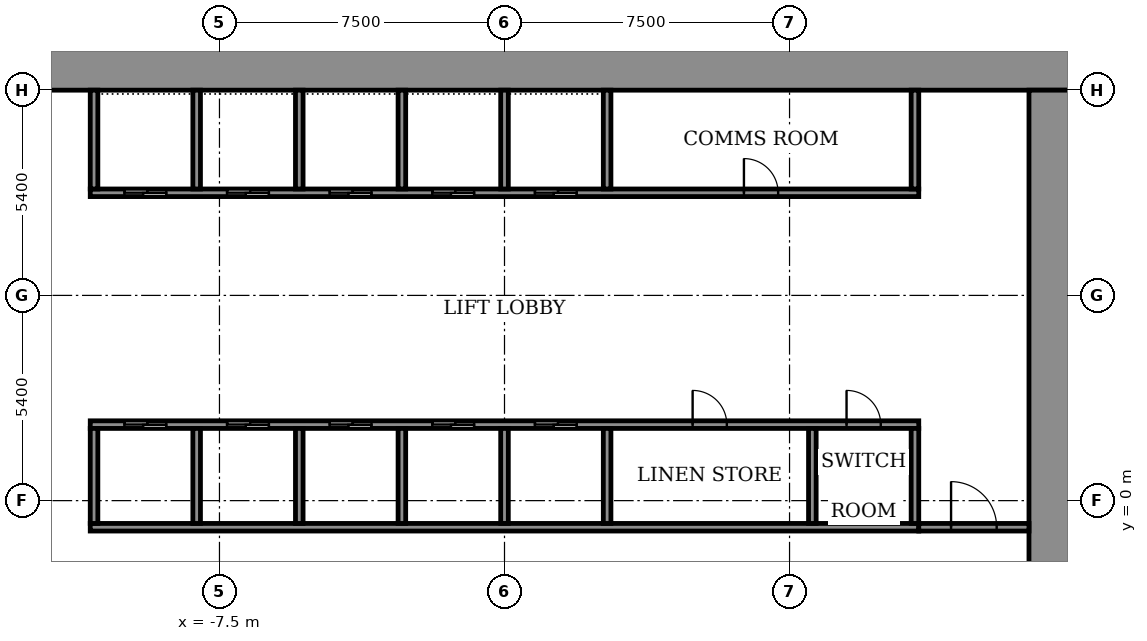
"""IFC4 building model, lengths in metres.
Left out: names, types, materials, properties, quantities, classifications, styles, units other than length and angle.
Written with IfcOpenShell. Run it as: python <this file> out.ifc"""

import sys

from ifc_helpers import new_model, si_unit, direction, frame, frame_2d, origin, place, context, subcontext, project, spatial, rectangle, extrude, element, fill, save


model = new_model("IFC4")
c1 = context("Model", 3, precision=1e-05, world=origin(), true_north=direction((0.0, 1.0)))
c2 = subcontext(c1, "Body", "Model", "MODEL_VIEW")
j1 = project(units=[si_unit("LENGTHUNIT", "METRE"), si_unit("PLANEANGLEUNIT", "RADIAN")], contexts=[c1])
p1 = place(None, origin())
s1 = spatial("IfcSite", under=j1, at=p1, CompositionType="ELEMENT")
p2 = place(p1, origin())
s2 = spatial("IfcBuilding", under=s1, at=p2, CompositionType="ELEMENT")
p3 = place(p2, frame((0.0, 0.0, 71.1)))
s3 = spatial("IfcBuildingStorey", under=s2, at=p3, CompositionType="ELEMENT", Elevation=71.1)
p4 = place(p3, frame((-14.9, 11.35, 0.0), z_axis=(0.0, 0.0, 1.0), x_axis=(1.0, 0.0, 0.0)))
e1 = element("IfcWall", 1, at=p4, inside=s3, PredefinedType="SHEAR", context=c2, shape_type="SweptSolid", body=[
    extrude(rectangle(XDim=29.8, YDim=1.1, at=frame_2d((14.9, 0.0))), origin(), (0.0, 0.0, 1.0), 3.6),
])
p5 = place(p3, frame((14.35, -10.8, 0.0), z_axis=(0.0, 0.0, 1.0), x_axis=(0.0, 1.0, 0.0)))
e2 = element("IfcWall", 2, at=p5, inside=s3, PredefinedType="SHEAR", context=c2, shape_type="SweptSolid", body=[
    extrude(rectangle(XDim=21.6, YDim=1.1, at=frame_2d((10.8, 0.0))), origin(), (0.0, 0.0, 1.0), 3.6),
])
p6 = place(p5, frame((1.2, 0.0, 0.0)))
e3 = element("IfcOpeningElement", 3, at=p6, cuts=e2, PredefinedType="OPENING", context=c2, shape_type="SweptSolid", body=[
    extrude(rectangle(XDim=1.2, YDim=2.1, at=frame_2d((0.6, 1.05))), frame((0.0, 0.56, 0.0), z_axis=(0.0, -1.0, 0.0), x_axis=(1.0, 0.0, 0.0)), (0.0, 0.0, 1.0), 1.12),
])
p7 = place(p3, frame((-10.9, -0.7, 0.0), z_axis=(0.0, 0.0, 1.0), x_axis=(1.0, 0.0, 0.0)))
e4 = element("IfcWall", 4, at=p7, inside=s3, PredefinedType="SHEAR", context=c2, shape_type="SweptSolid", body=[
    extrude(rectangle(XDim=21.8, YDim=0.2, at=frame_2d((10.9, 0.0))), origin(), (0.0, 0.0, 1.0), 3.05),
])
p8 = place(p3, frame((-10.9, 2.0, 0.0), z_axis=(0.0, 0.0, 1.0), x_axis=(1.0, 0.0, 0.0)))
e5 = element("IfcWall", 5, at=p8, inside=s3, PredefinedType="SHEAR", context=c2, shape_type="SweptSolid", body=[
    extrude(rectangle(XDim=21.8, YDim=0.2, at=frame_2d((10.9, 0.0))), origin(), (0.0, 0.0, 1.0), 3.05),
])
p9 = place(p8, frame((0.9, 0.0, 0.0)))
e6 = element("IfcOpeningElement", 6, at=p9, cuts=e5, PredefinedType="OPENING", context=c2, shape_type="SweptSolid", body=[
    extrude(rectangle(XDim=1.1, YDim=2.1, at=frame_2d((0.55, 1.05))), frame((0.0, 0.11, 0.0), z_axis=(0.0, -1.0, 0.0), x_axis=(1.0, 0.0, 0.0)), (0.0, 0.0, 1.0), 0.22),
])
p10 = place(p8, frame((3.6, 0.0, 0.0)))
e7 = element("IfcOpeningElement", 7, at=p10, cuts=e5, PredefinedType="OPENING", context=c2, shape_type="SweptSolid", body=[
    extrude(rectangle(XDim=1.1, YDim=2.1, at=frame_2d((0.55, 1.05))), frame((0.0, 0.11, 0.0), z_axis=(0.0, -1.0, 0.0), x_axis=(1.0, 0.0, 0.0)), (0.0, 0.0, 1.0), 0.22),
])
p11 = place(p8, frame((6.3, 0.0, 0.0)))
e8 = element("IfcOpeningElement", 8, at=p11, cuts=e5, PredefinedType="OPENING", context=c2, shape_type="SweptSolid", body=[
    extrude(rectangle(XDim=1.1, YDim=2.1, at=frame_2d((0.55, 1.05))), frame((0.0, 0.11, 0.0), z_axis=(0.0, -1.0, 0.0), x_axis=(1.0, 0.0, 0.0)), (0.0, 0.0, 1.0), 0.22),
])
p12 = place(p8, frame((9.0, 0.0, 0.0)))
e9 = element("IfcOpeningElement", 9, at=p12, cuts=e5, PredefinedType="OPENING", context=c2, shape_type="SweptSolid", body=[
    extrude(rectangle(XDim=1.1, YDim=2.1, at=frame_2d((0.55, 1.05))), frame((0.0, 0.11, 0.0), z_axis=(0.0, -1.0, 0.0), x_axis=(1.0, 0.0, 0.0)), (0.0, 0.0, 1.0), 0.22),
])
p13 = place(p8, frame((11.7, 0.0, 0.0)))
e10 = element("IfcOpeningElement", 10, at=p13, cuts=e5, PredefinedType="OPENING", context=c2, shape_type="SweptSolid", body=[
    extrude(rectangle(XDim=1.1, YDim=2.1, at=frame_2d((0.55, 1.05))), frame((0.0, 0.11, 0.0), z_axis=(0.0, -1.0, 0.0), x_axis=(1.0, 0.0, 0.0)), (0.0, 0.0, 1.0), 0.22),
])
p14 = place(p8, frame((15.85, 0.0, 0.0)))
e11 = element("IfcOpeningElement", 11, at=p14, cuts=e5, PredefinedType="OPENING", context=c2, shape_type="SweptSolid", body=[
    extrude(rectangle(XDim=0.9, YDim=2.1, at=frame_2d((0.45, 1.05))), frame((0.0, 0.11, 0.0), z_axis=(0.0, -1.0, 0.0), x_axis=(1.0, 0.0, 0.0)), (0.0, 0.0, 1.0), 0.22),
])
p15 = place(p8, frame((19.9, 0.0, 0.0)))
e12 = element("IfcOpeningElement", 12, at=p15, cuts=e5, PredefinedType="OPENING", context=c2, shape_type="SweptSolid", body=[
    extrude(rectangle(XDim=0.9, YDim=2.1, at=frame_2d((0.45, 1.05))), frame((0.0, 0.11, 0.0), z_axis=(0.0, -1.0, 0.0), x_axis=(1.0, 0.0, 0.0)), (0.0, 0.0, 1.0), 0.22),
])
p16 = place(p3, frame((-10.9, 8.1, 0.0), z_axis=(0.0, 0.0, 1.0), x_axis=(1.0, 0.0, 0.0)))
e13 = element("IfcWall", 13, at=p16, inside=s3, PredefinedType="SHEAR", context=c2, shape_type="SweptSolid", body=[
    extrude(rectangle(XDim=21.8, YDim=0.2, at=frame_2d((10.9, 0.0))), origin(), (0.0, 0.0, 1.0), 3.05),
])
p17 = place(p16, frame((0.9, 0.0, 0.0)))
e14 = element("IfcOpeningElement", 14, at=p17, cuts=e13, PredefinedType="OPENING", context=c2, shape_type="SweptSolid", body=[
    extrude(rectangle(XDim=1.1, YDim=2.1, at=frame_2d((0.55, 1.05))), frame((0.0, 0.11, 0.0), z_axis=(0.0, -1.0, 0.0), x_axis=(1.0, 0.0, 0.0)), (0.0, 0.0, 1.0), 0.22),
])
p18 = place(p16, frame((3.6, 0.0, 0.0)))
e15 = element("IfcOpeningElement", 15, at=p18, cuts=e13, PredefinedType="OPENING", context=c2, shape_type="SweptSolid", body=[
    extrude(rectangle(XDim=1.1, YDim=2.1, at=frame_2d((0.55, 1.05))), frame((0.0, 0.11, 0.0), z_axis=(0.0, -1.0, 0.0), x_axis=(1.0, 0.0, 0.0)), (0.0, 0.0, 1.0), 0.22),
])
p19 = place(p16, frame((6.3, 0.0, 0.0)))
e16 = element("IfcOpeningElement", 16, at=p19, cuts=e13, PredefinedType="OPENING", context=c2, shape_type="SweptSolid", body=[
    extrude(rectangle(XDim=1.1, YDim=2.1, at=frame_2d((0.55, 1.05))), frame((0.0, 0.11, 0.0), z_axis=(0.0, -1.0, 0.0), x_axis=(1.0, 0.0, 0.0)), (0.0, 0.0, 1.0), 0.22),
])
p20 = place(p16, frame((9.0, 0.0, 0.0)))
e17 = element("IfcOpeningElement", 17, at=p20, cuts=e13, PredefinedType="OPENING", context=c2, shape_type="SweptSolid", body=[
    extrude(rectangle(XDim=1.1, YDim=2.1, at=frame_2d((0.55, 1.05))), frame((0.0, 0.11, 0.0), z_axis=(0.0, -1.0, 0.0), x_axis=(1.0, 0.0, 0.0)), (0.0, 0.0, 1.0), 0.22),
])
p21 = place(p16, frame((11.7, 0.0, 0.0)))
e18 = element("IfcOpeningElement", 18, at=p21, cuts=e13, PredefinedType="OPENING", context=c2, shape_type="SweptSolid", body=[
    extrude(rectangle(XDim=1.1, YDim=2.1, at=frame_2d((0.55, 1.05))), frame((0.0, 0.11, 0.0), z_axis=(0.0, -1.0, 0.0), x_axis=(1.0, 0.0, 0.0)), (0.0, 0.0, 1.0), 0.22),
])
p22 = place(p16, frame((17.2, 0.0, 0.0)))
e19 = element("IfcOpeningElement", 19, at=p22, cuts=e13, PredefinedType="OPENING", context=c2, shape_type="SweptSolid", body=[
    extrude(rectangle(XDim=0.9, YDim=2.1, at=frame_2d((0.45, 1.05))), frame((0.0, 0.11, 0.0), z_axis=(0.0, -1.0, 0.0), x_axis=(1.0, 0.0, 0.0)), (0.0, 0.0, 1.0), 0.22),
])
for number, where, z_axis, x_axis in (
    (20, (-10.8, -0.6, 0.0), (0.0, 0.0, 1.0), (0.0, 1.0, 0.0)),
    (21, (-8.1, -0.6, 0.0), (0.0, 0.0, 1.0), (0.0, 1.0, 0.0)),
    (22, (-5.4, -0.6, 0.0), (0.0, 0.0, 1.0), (0.0, 1.0, 0.0)),
    (23, (-2.7, -0.6, 0.0), (0.0, 0.0, 1.0), (0.0, 1.0, 0.0)),
    (24, (0.0, -0.6, 0.0), (0.0, 0.0, 1.0), (0.0, 1.0, 0.0)),
    (25, (2.7, -0.6, 0.0), (0.0, 0.0, 1.0), (0.0, 1.0, 0.0)),
):
    element("IfcWall", number, at=place(p3, frame(where, z_axis=z_axis, x_axis=x_axis)), inside=s3, PredefinedType="SHEAR", context=c2, shape_type="SweptSolid", body=[
        extrude(rectangle(XDim=2.5, YDim=0.2, at=frame_2d((1.25, 0.0))), origin(), (0.0, 0.0, 1.0), 3.05),
    ])
for number, where, z_axis, x_axis in (
    (26, (8.1, -0.6, 0.0), (0.0, 0.0, 1.0), (0.0, 1.0, 0.0)),
    (27, (10.8, -0.6, 0.0), (0.0, 0.0, 1.0), (0.0, 1.0, 0.0)),
):
    element("IfcWall", number, at=place(p3, frame(where, z_axis=z_axis, x_axis=x_axis)), inside=s3, PredefinedType="STANDARD", context=c2, shape_type="SweptSolid", body=[
        extrude(rectangle(XDim=2.5, YDim=0.2, at=frame_2d((1.25, 0.0))), origin(), (0.0, 0.0, 1.0), 3.05),
    ])
for number, where, z_axis, x_axis in (
    (28, (-10.8, 8.2, 0.0), (0.0, 0.0, 1.0), (0.0, 1.0, 0.0)),
    (29, (-8.1, 8.2, 0.0), (0.0, 0.0, 1.0), (0.0, 1.0, 0.0)),
    (30, (-5.4, 8.2, 0.0), (0.0, 0.0, 1.0), (0.0, 1.0, 0.0)),
    (31, (-2.7, 8.2, 0.0), (0.0, 0.0, 1.0), (0.0, 1.0, 0.0)),
    (32, (0.0, 8.2, 0.0), (0.0, 0.0, 1.0), (0.0, 1.0, 0.0)),
    (33, (2.7, 8.2, 0.0), (0.0, 0.0, 1.0), (0.0, 1.0, 0.0)),
):
    element("IfcWall", number, at=place(p3, frame(where, z_axis=z_axis, x_axis=x_axis)), inside=s3, PredefinedType="SHEAR", context=c2, shape_type="SweptSolid", body=[
        extrude(rectangle(XDim=2.6, YDim=0.2, at=frame_2d((1.3, 0.0))), origin(), (0.0, 0.0, 1.0), 3.05),
    ])
p23 = place(p3, frame((10.8, 8.2, 0.0), z_axis=(0.0, 0.0, 1.0), x_axis=(0.0, 1.0, 0.0)))
e34 = element("IfcWall", 34, at=p23, inside=s3, PredefinedType="STANDARD", context=c2, shape_type="SweptSolid", body=[
    extrude(rectangle(XDim=2.6, YDim=0.2, at=frame_2d((1.3, 0.0))), origin(), (0.0, 0.0, 1.0), 3.05),
])
p24 = place(p3, frame((10.9, -0.7, 0.0), z_axis=(0.0, 0.0, 1.0), x_axis=(1.0, 0.0, 0.0)))
e35 = element("IfcWall", 35, at=p24, inside=s3, PredefinedType="STANDARD", context=c2, shape_type="SweptSolid", body=[
    extrude(rectangle(XDim=2.9, YDim=0.2, at=frame_2d((1.45, 0.0))), origin(), (0.0, 0.0, 1.0), 3.05),
])
p25 = place(p24, frame((0.85, 0.0, 0.0)))
e36 = element("IfcOpeningElement", 36, at=p25, cuts=e35, PredefinedType="OPENING", context=c2, shape_type="SweptSolid", body=[
    extrude(rectangle(XDim=1.2, YDim=2.1, at=frame_2d((0.6, 1.05))), frame((0.0, 0.11, 0.0), z_axis=(0.0, -1.0, 0.0), x_axis=(1.0, 0.0, 0.0)), (0.0, 0.0, 1.0), 0.22),
])
p26 = place(p9, origin())
e37 = element("IfcDoor", 37, at=p26, inside=s3, OperationType="SLIDING_TO_LEFT", PredefinedType="DOOR", context=c2, shape_type="SweptSolid", body=[
    extrude(rectangle(XDim=1.1, YDim=2.1, at=frame_2d((0.55, 1.05))), frame((0.0, 0.025, 0.0), z_axis=(0.0, -1.0, 0.0), x_axis=(1.0, 0.0, 0.0)), (0.0, 0.0, 1.0), 0.05),
])
fill(e6, e37)
p27 = place(p10, origin())
e38 = element("IfcDoor", 38, at=p27, inside=s3, OperationType="SLIDING_TO_LEFT", PredefinedType="DOOR", context=c2, shape_type="SweptSolid", body=[
    extrude(rectangle(XDim=1.1, YDim=2.1, at=frame_2d((0.55, 1.05))), frame((0.0, 0.025, 0.0), z_axis=(0.0, -1.0, 0.0), x_axis=(1.0, 0.0, 0.0)), (0.0, 0.0, 1.0), 0.05),
])
fill(e7, e38)
p28 = place(p11, origin())
e39 = element("IfcDoor", 39, at=p28, inside=s3, OperationType="SLIDING_TO_LEFT", PredefinedType="DOOR", context=c2, shape_type="SweptSolid", body=[
    extrude(rectangle(XDim=1.1, YDim=2.1, at=frame_2d((0.55, 1.05))), frame((0.0, 0.025, 0.0), z_axis=(0.0, -1.0, 0.0), x_axis=(1.0, 0.0, 0.0)), (0.0, 0.0, 1.0), 0.05),
])
fill(e8, e39)
p29 = place(p12, origin())
e40 = element("IfcDoor", 40, at=p29, inside=s3, OperationType="SLIDING_TO_LEFT", PredefinedType="DOOR", context=c2, shape_type="SweptSolid", body=[
    extrude(rectangle(XDim=1.1, YDim=2.1, at=frame_2d((0.55, 1.05))), frame((0.0, 0.025, 0.0), z_axis=(0.0, -1.0, 0.0), x_axis=(1.0, 0.0, 0.0)), (0.0, 0.0, 1.0), 0.05),
])
fill(e9, e40)
p30 = place(p13, origin())
e41 = element("IfcDoor", 41, at=p30, inside=s3, OperationType="SLIDING_TO_LEFT", PredefinedType="DOOR", context=c2, shape_type="SweptSolid", body=[
    extrude(rectangle(XDim=1.1, YDim=2.1, at=frame_2d((0.55, 1.05))), frame((0.0, 0.025, 0.0), z_axis=(0.0, -1.0, 0.0), x_axis=(1.0, 0.0, 0.0)), (0.0, 0.0, 1.0), 0.05),
])
fill(e10, e41)
p31 = place(p17, origin())
e42 = element("IfcDoor", 42, at=p31, inside=s3, OperationType="SLIDING_TO_LEFT", PredefinedType="DOOR", context=c2, shape_type="SweptSolid", body=[
    extrude(rectangle(XDim=1.1, YDim=2.1, at=frame_2d((0.55, 1.05))), frame((0.0, 0.025, 0.0), z_axis=(0.0, -1.0, 0.0), x_axis=(1.0, 0.0, 0.0)), (0.0, 0.0, 1.0), 0.05),
])
fill(e14, e42)
p32 = place(p18, origin())
e43 = element("IfcDoor", 43, at=p32, inside=s3, OperationType="SLIDING_TO_LEFT", PredefinedType="DOOR", context=c2, shape_type="SweptSolid", body=[
    extrude(rectangle(XDim=1.1, YDim=2.1, at=frame_2d((0.55, 1.05))), frame((0.0, 0.025, 0.0), z_axis=(0.0, -1.0, 0.0), x_axis=(1.0, 0.0, 0.0)), (0.0, 0.0, 1.0), 0.05),
])
fill(e15, e43)
p33 = place(p19, origin())
e44 = element("IfcDoor", 44, at=p33, inside=s3, OperationType="SLIDING_TO_LEFT", PredefinedType="DOOR", context=c2, shape_type="SweptSolid", body=[
    extrude(rectangle(XDim=1.1, YDim=2.1, at=frame_2d((0.55, 1.05))), frame((0.0, 0.025, 0.0), z_axis=(0.0, -1.0, 0.0), x_axis=(1.0, 0.0, 0.0)), (0.0, 0.0, 1.0), 0.05),
])
fill(e16, e44)
p34 = place(p20, origin())
e45 = element("IfcDoor", 45, at=p34, inside=s3, OperationType="SLIDING_TO_LEFT", PredefinedType="DOOR", context=c2, shape_type="SweptSolid", body=[
    extrude(rectangle(XDim=1.1, YDim=2.1, at=frame_2d((0.55, 1.05))), frame((0.0, 0.025, 0.0), z_axis=(0.0, -1.0, 0.0), x_axis=(1.0, 0.0, 0.0)), (0.0, 0.0, 1.0), 0.05),
])
fill(e17, e45)
p35 = place(p21, origin())
e46 = element("IfcDoor", 46, at=p35, inside=s3, OperationType="SLIDING_TO_LEFT", PredefinedType="DOOR", context=c2, shape_type="SweptSolid", body=[
    extrude(rectangle(XDim=1.1, YDim=2.1, at=frame_2d((0.55, 1.05))), frame((0.0, 0.025, 0.0), z_axis=(0.0, -1.0, 0.0), x_axis=(1.0, 0.0, 0.0)), (0.0, 0.0, 1.0), 0.05),
])
fill(e18, e46)
p36 = place(p14, origin())
e47 = element("IfcDoor", 47, at=p36, inside=s3, OperationType="SINGLE_SWING_RIGHT", PredefinedType="DOOR", context=c2, shape_type="SweptSolid", body=[
    extrude(rectangle(XDim=0.9, YDim=2.1, at=frame_2d((0.45, 1.05))), frame((0.0, 0.025, 0.0), z_axis=(0.0, -1.0, 0.0), x_axis=(1.0, 0.0, 0.0)), (0.0, 0.0, 1.0), 0.05),
])
fill(e11, e47)
p37 = place(p15, origin())
e48 = element("IfcDoor", 48, at=p37, inside=s3, OperationType="SINGLE_SWING_LEFT", PredefinedType="DOOR", context=c2, shape_type="SweptSolid", body=[
    extrude(rectangle(XDim=0.9, YDim=2.1, at=frame_2d((0.45, 1.05))), frame((0.0, 0.025, 0.0), z_axis=(0.0, -1.0, 0.0), x_axis=(1.0, 0.0, 0.0)), (0.0, 0.0, 1.0), 0.05),
])
fill(e12, e48)
p38 = place(p22, origin())
e49 = element("IfcDoor", 49, at=p38, inside=s3, OperationType="SINGLE_SWING_LEFT", PredefinedType="DOOR", context=c2, shape_type="SweptSolid", body=[
    extrude(rectangle(XDim=0.9, YDim=2.1, at=frame_2d((0.45, 1.05))), frame((0.0, 0.025, 0.0), z_axis=(0.0, -1.0, 0.0), x_axis=(1.0, 0.0, 0.0)), (0.0, 0.0, 1.0), 0.05),
])
fill(e19, e49)
p39 = place(p25, origin())
e50 = element("IfcDoor", 50, at=p39, inside=s3, OperationType="SINGLE_SWING_LEFT", PredefinedType="DOOR", context=c2, shape_type="SweptSolid", body=[
    extrude(rectangle(XDim=1.2, YDim=2.1, at=frame_2d((0.6, 1.05))), frame((0.0, 0.025, 0.0), z_axis=(0.0, -1.0, 0.0), x_axis=(1.0, 0.0, 0.0)), (0.0, 0.0, 1.0), 0.05),
])
fill(e36, e50)
save(model, sys.argv[1])
